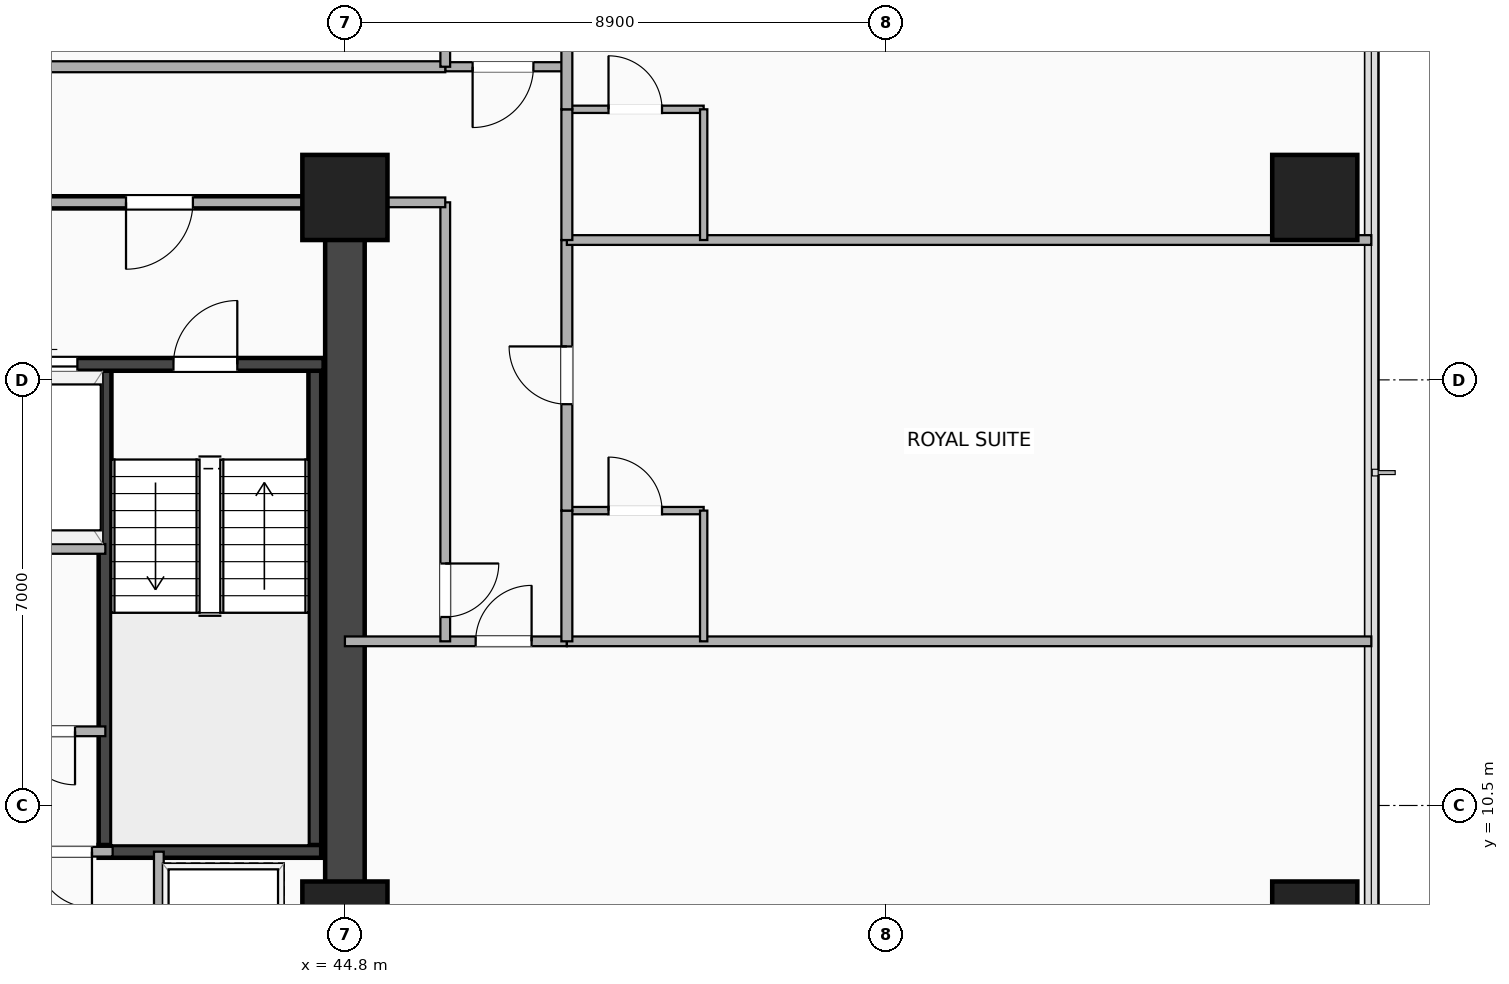
"""IFC4 building model, lengths in metres.
Left out: names, types, materials, properties, quantities, classifications, styles, units other than length and angle.
Written with IfcOpenShell. Run it as: python <this file> out.ifc"""

import sys

from ifc_helpers import new_model, si_unit, direction, frame, frame_2d, origin, origin_2d, place, context, subcontext, project, spatial, rectangle, extrude, element, fill, save


model = new_model("IFC4")
c1 = context("Model", 3, precision=1e-05, world=origin(), true_north=direction((0.0, 1.0)))
c2 = subcontext(c1, "Body", "Model", "MODEL_VIEW")
j1 = project(units=[si_unit("LENGTHUNIT", "METRE"), si_unit("PLANEANGLEUNIT", "RADIAN")], contexts=[c1])
p1 = place(None, origin())
s1 = spatial("IfcSite", under=j1, at=p1, CompositionType="ELEMENT")
p2 = place(p1, origin())
s2 = spatial("IfcBuilding", under=s1, at=p2, CompositionType="ELEMENT")
p3 = place(p2, frame((0.0, 0.0, 68.4)))
s3 = spatial("IfcBuildingStorey", under=s2, at=p3, CompositionType="ELEMENT", Elevation=68.4)
p4 = place(p3, frame((44.8, 3.5, 0.0), z_axis=(0.0, 0.0, 1.0), x_axis=(0.0, 1.0, 0.0)))
e1 = element("IfcWall", 1, at=p4, inside=s3, PredefinedType="SHEAR", context=c2, shape_type="SweptSolid", body=[
    extrude(rectangle(XDim=16.9, YDim=0.65, at=frame_2d((8.45, 0.0))), origin(), (0.0, 0.0, 1.0), 3.22),
])
for number, where, z_axis, x_axis in (
    (2, (40.855, 9.745, 0.0), (0.0, 0.0, 1.0), (0.0, 1.0, 0.0)),
    (3, (44.305, 9.745, 0.0), (0.0, 0.0, 1.0), (0.0, 1.0, 0.0)),
):
    element("IfcWall", number, at=place(p3, frame(where, z_axis=z_axis, x_axis=x_axis)), inside=s3, PredefinedType="SHEAR", context=c2, shape_type="SweptSolid", body=[
        extrude(rectangle(XDim=8.01, YDim=0.21, at=frame_2d((4.005, 0.0))), origin(), (0.0, 0.0, 1.0), 3.22),
    ])
p5 = place(p3, frame((40.75, 9.745, 0.0), z_axis=(0.0, 0.0, 1.0), x_axis=(1.0, 0.0, 0.0)))
e4 = element("IfcWall", 4, at=p5, inside=s3, PredefinedType="SHEAR", context=c2, shape_type="SweptSolid", body=[
    extrude(rectangle(XDim=3.66, YDim=0.21, at=frame_2d((1.83, 0.0))), origin(), (0.0, 0.0, 1.0), 3.22),
])
p6 = place(p3, frame((37.25, 17.755, 0.0), z_axis=(0.0, 0.0, 1.0), x_axis=(1.0, 0.0, 0.0)))
e5 = element("IfcWall", 5, at=p6, inside=s3, PredefinedType="SHEAR", context=c2, shape_type="SweptSolid", body=[
    extrude(rectangle(XDim=7.2, YDim=0.21, at=frame_2d((3.6, 0.0))), origin(), (0.0, 0.0, 1.0), 3.22),
])
p7 = place(p6, frame((0.25, 0.0, 0.0)))
e6 = element("IfcOpeningElement", 6, at=p7, cuts=e5, PredefinedType="OPENING", context=c2, shape_type="SweptSolid", body=[
    extrude(rectangle(XDim=1.12, YDim=2.2, at=frame_2d((0.56, 1.1))), frame((0.0, 0.115, 0.0), z_axis=(0.0, -1.0, 0.0), x_axis=(1.0, 0.0, 0.0)), (0.0, 0.0, 1.0), 0.23),
])
p8 = place(p6, frame((2.05, 0.0, 0.0)))
e7 = element("IfcOpeningElement", 7, at=p8, cuts=e5, PredefinedType="OPENING", context=c2, shape_type="SweptSolid", body=[
    extrude(rectangle(XDim=1.1, YDim=2.18, at=frame_2d((0.55, 1.09))), frame((0.0, 0.115, 0.0), z_axis=(0.0, -1.0, 0.0), x_axis=(1.0, 0.0, 0.0)), (0.0, 0.0, 1.0), 0.23),
])
p9 = place(p6, frame((5.78, 0.0, 0.0), z_axis=(0.0, 0.0, 1.0), x_axis=(-1.0, 0.0, 0.0)))
e8 = element("IfcOpeningElement", 8, at=p9, cuts=e5, PredefinedType="OPENING", context=c2, shape_type="SweptSolid", body=[
    extrude(rectangle(XDim=1.05, YDim=2.15, at=frame_2d((0.525, 1.075))), frame((0.0, 0.115, 0.0), z_axis=(0.0, -1.0, 0.0), x_axis=(1.0, 0.0, 0.0)), (0.0, 0.0, 1.0), 0.23),
])
for number, where, z_axis, x_axis in (
    (9, (44.8, 8.55, -0.28), (0.0, 0.0, 1.0), (1.0, 0.0, 0.0)),
    (10, (44.8, 20.5, -0.28), (0.0, 0.0, 1.0), (1.0, 0.0, 0.0)),
    (11, (60.75, 8.55, -0.28), (0.0, 0.0, 1.0), (1.0, 0.0, 0.0)),
    (12, (60.75, 20.5, -0.28), (0.0, 0.0, 1.0), (1.0, 0.0, 0.0)),
):
    element("IfcColumn", number, at=place(p3, frame(where, z_axis=z_axis, x_axis=x_axis)), inside=s3, PredefinedType="COLUMN", context=c2, shape_type="SweptSolid", body=[
        extrude(rectangle(XDim=1.4, YDim=1.4, at=origin_2d()), origin(), (0.0, 0.0, 1.0), 3.5),
    ])
p10 = place(p3, frame((37.25, 14.72, 0.0), z_axis=(0.0, 0.0, 1.0), x_axis=(1.0, 0.0, 0.0)))
e13 = element("IfcWall", 13, at=p10, inside=s3, PredefinedType="PARTITIONING", context=c2, shape_type="SweptSolid", body=[
    extrude(rectangle(XDim=3.61, YDim=0.16, at=frame_2d((1.805, 0.0))), origin(), (0.0, 0.0, 1.0), 3.22),
])
p11 = place(p3, frame((37.0, 20.42, 0.0), z_axis=(0.0, 0.0, 1.0), x_axis=(1.0, 0.0, 0.0)))
e14 = element("IfcWall", 14, at=p11, inside=s3, PredefinedType="PARTITIONING", context=c2, shape_type="SweptSolid", body=[
    extrude(rectangle(XDim=7.45, YDim=0.2, at=frame_2d((3.725, 0.0))), origin(), (0.0, 0.0, 1.0), 2.51),
])
p12 = place(p11, frame((4.2, 0.0, 0.0)))
e15 = element("IfcOpeningElement", 15, at=p12, cuts=e14, PredefinedType="OPENING", context=c2, shape_type="SweptSolid", body=[
    extrude(rectangle(XDim=1.1, YDim=2.15, at=frame_2d((0.55, 1.075))), frame((0.0, 0.11, 0.0), z_axis=(0.0, -1.0, 0.0), x_axis=(1.0, 0.0, 0.0)), (0.0, 0.0, 1.0), 0.22),
])
p13 = place(p3, frame((38.983, 11.72, 0.0), z_axis=(0.0, 0.0, 1.0), x_axis=(1.0, 0.0, 0.0)))
e16 = element("IfcWall", 16, at=p13, inside=s3, PredefinedType="PARTITIONING", context=c2, shape_type="SweptSolid", body=[
    extrude(rectangle(XDim=1.877, YDim=0.16, at=frame_2d((0.938, 0.0))), origin(), (0.0, 0.0, 1.0), 3.22),
])
p14 = place(p13, frame((0.499, 0.0, 0.0)))
e17 = element("IfcOpeningElement", 17, at=p14, cuts=e16, PredefinedType="OPENING", context=c2, shape_type="SweptSolid", body=[
    extrude(rectangle(XDim=0.88, YDim=2.08, at=frame_2d((0.44, 1.04))), frame((0.0, 0.09, 0.0), z_axis=(0.0, -1.0, 0.0), x_axis=(1.0, 0.0, 0.0)), (0.0, 0.0, 1.0), 0.18),
])
p15 = place(p3, frame((41.74, 3.9, 0.0), z_axis=(0.0, 0.0, 1.0), x_axis=(0.0, 1.0, 0.0)))
e18 = element("IfcWall", 18, at=p15, inside=s3, PredefinedType="PARTITIONING", context=c2, shape_type="SweptSolid", body=[
    extrude(rectangle(XDim=5.84, YDim=0.16, at=frame_2d((2.92, 0.0))), origin(), (0.0, 0.0, 1.0), 3.22),
])
p16 = place(p3, frame((39.42, 9.74, 0.0), z_axis=(0.0, 0.0, 1.0), x_axis=(1.0, 0.0, 0.0)))
e19 = element("IfcWall", 19, at=p16, inside=s3, PredefinedType="PARTITIONING", context=c2, shape_type="SweptSolid", body=[
    extrude(rectangle(XDim=1.56, YDim=0.16, at=frame_2d((0.78, 0.0))), origin(), (0.0, 0.0, 1.0), 3.22),
])
p17 = place(p16, frame((0.3, 0.0, 0.0)))
e20 = element("IfcOpeningElement", 20, at=p17, cuts=e19, PredefinedType="OPENING", context=c2, shape_type="SweptSolid", body=[
    extrude(rectangle(XDim=0.92, YDim=2.08, at=frame_2d((0.46, 1.04))), frame((0.0, 0.09, 0.0), z_axis=(0.0, -1.0, 0.0), x_axis=(1.0, 0.0, 0.0)), (0.0, 0.0, 1.0), 0.18),
])
p18 = place(p3, frame((44.8, 13.2, 0.0), z_axis=(0.0, 0.0, 1.0), x_axis=(1.0, 0.0, 0.0)))
e21 = element("IfcWall", 21, at=p18, inside=s3, PredefinedType="PARTITIONING", context=c2, shape_type="SweptSolid", body=[
    extrude(rectangle(XDim=3.65, YDim=0.16, at=frame_2d((1.825, 0.0))), origin(), (0.0, 0.0, 1.0), 2.51),
])
p19 = place(p18, frame((3.07, 0.0, 0.0), z_axis=(0.0, 0.0, 1.0), x_axis=(-1.0, 0.0, 0.0)))
e22 = element("IfcOpeningElement", 22, at=p19, cuts=e21, PredefinedType="OPENING", context=c2, shape_type="SweptSolid", body=[
    extrude(rectangle(XDim=0.92, YDim=2.08, at=frame_2d((0.46, 1.04))), frame((0.0, 0.09, 0.0), z_axis=(0.0, -1.0, 0.0), x_axis=(1.0, 0.0, 0.0)), (0.0, 0.0, 1.0), 0.18),
])
p20 = place(p3, frame((46.45, 13.2, 0.0), z_axis=(0.0, 0.0, 1.0), x_axis=(0.0, 1.0, 0.0)))
e23 = element("IfcWall", 23, at=p20, inside=s3, PredefinedType="PARTITIONING", context=c2, shape_type="SweptSolid", body=[
    extrude(rectangle(XDim=7.22, YDim=0.16, at=frame_2d((3.61, 0.0))), origin(), (0.0, 0.0, 1.0), 2.51),
])
p21 = place(p20, frame((0.4, 0.0, 0.0)))
e24 = element("IfcOpeningElement", 24, at=p21, cuts=e23, PredefinedType="OPENING", context=c2, shape_type="SweptSolid", body=[
    extrude(rectangle(XDim=0.88, YDim=2.08, at=frame_2d((0.44, 1.04))), frame((0.0, 0.09, 0.0), z_axis=(0.0, -1.0, 0.0), x_axis=(1.0, 0.0, 0.0)), (0.0, 0.0, 1.0), 0.18),
])
p22 = place(p3, frame((44.8, 20.42, 0.0), z_axis=(0.0, 0.0, 1.0), x_axis=(1.0, 0.0, 0.0)))
e25 = element("IfcWall", 25, at=p22, inside=s3, PredefinedType="PARTITIONING", context=c2, shape_type="SweptSolid", body=[
    extrude(rectangle(XDim=1.65, YDim=0.16, at=frame_2d((0.825, 0.0))), origin(), (0.0, 0.0, 1.0), 2.51),
])
p23 = place(p3, frame((46.45, 22.65, 0.0), z_axis=(0.0, 0.0, 1.0), x_axis=(1.0, 0.0, 0.0)))
e26 = element("IfcWall", 26, at=p23, inside=s3, PredefinedType="PARTITIONING", context=c2, shape_type="SweptSolid", body=[
    extrude(rectangle(XDim=2.0, YDim=0.15, at=frame_2d((1.0, 0.0))), origin(), (0.0, 0.0, 1.0), 3.22),
])
p24 = place(p23, frame((0.45, 0.0, 0.0)))
e27 = element("IfcOpeningElement", 27, at=p24, cuts=e26, PredefinedType="OPENING", context=c2, shape_type="SweptSolid", body=[
    extrude(rectangle(XDim=1.0, YDim=2.15, at=frame_2d((0.5, 1.075))), frame((0.0, 0.085, 0.0), z_axis=(0.0, -1.0, 0.0), x_axis=(1.0, 0.0, 0.0)), (0.0, 0.0, 1.0), 0.17),
])
p25 = place(p3, frame((24.1, 22.65, 0.0), z_axis=(0.0, 0.0, 1.0), x_axis=(1.0, 0.0, 0.0)))
e28 = element("IfcWall", 28, at=p25, inside=s3, PredefinedType="PARTITIONING", context=c2, shape_type="SweptSolid", body=[
    extrude(rectangle(XDim=22.35, YDim=0.18, at=frame_2d((11.175, 0.0))), origin(), (0.0, 0.0, 1.0), 2.51),
])
p26 = place(p25, frame((10.7, 0.0, 0.0)))
e29 = element("IfcOpeningElement", 29, at=p26, cuts=e28, PredefinedType="OPENING", context=c2, shape_type="SweptSolid", body=[
    extrude(rectangle(XDim=0.95, YDim=2.15, at=frame_2d((0.475, 1.075))), frame((0.0, 0.1, 0.0), z_axis=(0.0, -1.0, 0.0), x_axis=(1.0, 0.0, 0.0)), (0.0, 0.0, 1.0), 0.2),
])
p27 = place(p3, frame((46.45, 22.65, 0.0), z_axis=(0.0, 0.0, 1.0), x_axis=(0.0, 1.0, 0.0)))
e30 = element("IfcWall", 30, at=p27, inside=s3, PredefinedType="PARTITIONING", context=c2, shape_type="SweptSolid", body=[
    extrude(rectangle(XDim=10.35, YDim=0.16, at=frame_2d((5.175, 0.0))), origin(), (0.0, 0.0, 1.0), 2.51),
])
p28 = place(p3, frame((48.45, 13.2, 0.0), z_axis=(0.0, 0.0, 1.0), x_axis=(1.0, 0.0, 0.0)))
e31 = element("IfcWall", 31, at=p28, inside=s3, PredefinedType="PARTITIONING", context=c2, shape_type="SweptSolid", body=[
    extrude(rectangle(XDim=13.23, YDim=0.16, at=frame_2d((6.615, 0.0))), origin(), (0.0, 0.0, 1.0), 2.583),
])
p29 = place(p3, frame((48.45, 15.35, 0.0), z_axis=(0.0, 0.0, 1.0), x_axis=(1.0, 0.0, 0.0)))
e32 = element("IfcWall", 32, at=p29, inside=s3, PredefinedType="PARTITIONING", context=c2, shape_type="SweptSolid", body=[
    extrude(rectangle(XDim=2.25, YDim=0.12, at=frame_2d((1.125, 0.0))), origin(), (0.0, 0.0, 1.0), 3.22),
])
p30 = place(p29, frame((1.565, 0.0, 0.0), z_axis=(0.0, 0.0, 1.0), x_axis=(-1.0, 0.0, 0.0)))
e33 = element("IfcOpeningElement", 33, at=p30, cuts=e32, PredefinedType="OPENING", context=c2, shape_type="SweptSolid", body=[
    extrude(rectangle(XDim=0.88, YDim=2.08, at=frame_2d((0.44, 1.04))), frame((0.0, 0.07, 0.0), z_axis=(0.0, -1.0, 0.0), x_axis=(1.0, 0.0, 0.0)), (0.0, 0.0, 1.0), 0.14),
])
p31 = place(p3, frame((50.7, 13.2, 0.0), z_axis=(0.0, 0.0, 1.0), x_axis=(0.0, 1.0, 0.0)))
e34 = element("IfcWall", 34, at=p31, inside=s3, PredefinedType="PARTITIONING", context=c2, shape_type="SweptSolid", body=[
    extrude(rectangle(XDim=2.15, YDim=0.12, at=frame_2d((1.075, 0.0))), origin(), (0.0, 0.0, 1.0), 2.902),
])
p32 = place(p3, frame((48.45, 13.2, 0.0), z_axis=(0.0, 0.0, 1.0), x_axis=(0.0, 1.0, 0.0)))
e35 = element("IfcWall", 35, at=p32, inside=s3, PredefinedType="PARTITIONING", context=c2, shape_type="SweptSolid", body=[
    extrude(rectangle(XDim=2.15, YDim=0.18, at=frame_2d((1.075, 0.0))), origin(), (0.0, 0.0, 1.0), 2.902),
])
p33 = place(p3, frame((48.45, 15.35, 0.0), z_axis=(0.0, 0.0, 1.0), x_axis=(0.0, 1.0, 0.0)))
e36 = element("IfcWall", 36, at=p33, inside=s3, PredefinedType="PARTITIONING", context=c2, shape_type="SweptSolid", body=[
    extrude(rectangle(XDim=4.45, YDim=0.18, at=frame_2d((2.225, 0.0))), origin(), (0.0, 0.0, 1.0), 2.902),
])
p34 = place(p33, frame((2.7, 0.0, 0.0), z_axis=(0.0, 0.0, 1.0), x_axis=(-1.0, 0.0, 0.0)))
e37 = element("IfcOpeningElement", 37, at=p34, cuts=e36, PredefinedType="OPENING", context=c2, shape_type="SweptSolid", body=[
    extrude(rectangle(XDim=0.95, YDim=2.15, at=frame_2d((0.475, 1.075))), frame((0.0, 0.1, 0.0), z_axis=(0.0, -1.0, 0.0), x_axis=(1.0, 0.0, 0.0)), (0.0, 0.0, 1.0), 0.2),
])
p35 = place(p3, frame((48.45, 19.8, 0.0), z_axis=(0.0, 0.0, 1.0), x_axis=(1.0, 0.0, 0.0)))
e38 = element("IfcWall", 38, at=p35, inside=s3, PredefinedType="PARTITIONING", context=c2, shape_type="SweptSolid", body=[
    extrude(rectangle(XDim=13.23, YDim=0.16, at=frame_2d((6.615, 0.0))), origin(), (0.0, 0.0, 1.0), 2.583),
])
p36 = place(p3, frame((48.45, 21.95, 0.0), z_axis=(0.0, 0.0, 1.0), x_axis=(1.0, 0.0, 0.0)))
e39 = element("IfcWall", 39, at=p36, inside=s3, PredefinedType="PARTITIONING", context=c2, shape_type="SweptSolid", body=[
    extrude(rectangle(XDim=2.25, YDim=0.12, at=frame_2d((1.125, 0.0))), origin(), (0.0, 0.0, 1.0), 3.22),
])
p37 = place(p36, frame((1.565, 0.0, 0.0), z_axis=(0.0, 0.0, 1.0), x_axis=(-1.0, 0.0, 0.0)))
e40 = element("IfcOpeningElement", 40, at=p37, cuts=e39, PredefinedType="OPENING", context=c2, shape_type="SweptSolid", body=[
    extrude(rectangle(XDim=0.88, YDim=2.08, at=frame_2d((0.44, 1.04))), frame((0.0, 0.07, 0.0), z_axis=(0.0, -1.0, 0.0), x_axis=(1.0, 0.0, 0.0)), (0.0, 0.0, 1.0), 0.14),
])
p38 = place(p3, frame((50.7, 19.8, 0.0), z_axis=(0.0, 0.0, 1.0), x_axis=(0.0, 1.0, 0.0)))
e41 = element("IfcWall", 41, at=p38, inside=s3, PredefinedType="PARTITIONING", context=c2, shape_type="SweptSolid", body=[
    extrude(rectangle(XDim=2.15, YDim=0.12, at=frame_2d((1.075, 0.0))), origin(), (0.0, 0.0, 1.0), 2.51),
])
p39 = place(p3, frame((48.45, 19.8, 0.0), z_axis=(0.0, 0.0, 1.0), x_axis=(0.0, 1.0, 0.0)))
e42 = element("IfcWall", 42, at=p39, inside=s3, PredefinedType="PARTITIONING", context=c2, shape_type="SweptSolid", body=[
    extrude(rectangle(XDim=2.15, YDim=0.18, at=frame_2d((1.075, 0.0))), origin(), (0.0, 0.0, 1.0), 2.51),
])
p40 = place(p3, frame((48.45, 21.95, 0.0), z_axis=(0.0, 0.0, 1.0), x_axis=(0.0, 1.0, 0.0)))
e43 = element("IfcWall", 43, at=p40, inside=s3, PredefinedType="PARTITIONING", context=c2, shape_type="SweptSolid", body=[
    extrude(rectangle(XDim=4.45, YDim=0.18, at=frame_2d((2.225, 0.0))), origin(), (0.0, 0.0, 1.0), 2.788),
])
p41 = place(p40, frame((2.7, 0.0, 0.0), z_axis=(0.0, 0.0, 1.0), x_axis=(-1.0, 0.0, 0.0)))
e44 = element("IfcOpeningElement", 44, at=p41, cuts=e43, PredefinedType="OPENING", context=c2, shape_type="SweptSolid", body=[
    extrude(rectangle(XDim=0.95, YDim=2.15, at=frame_2d((0.475, 1.075))), frame((0.0, 0.1, 0.0), z_axis=(0.0, -1.0, 0.0), x_axis=(1.0, 0.0, 0.0)), (0.0, 0.0, 1.0), 0.2),
])
p42 = place(p8, origin())
e45 = element("IfcDoor", 45, at=p42, inside=s3, OperationType="DOUBLE_DOOR_SLIDING", PredefinedType="DOOR", context=c2, shape_type="SweptSolid", body=[
    extrude(rectangle(XDim=1.1, YDim=2.18, at=frame_2d((0.55, 1.09))), frame((0.0, 0.025, 0.0), z_axis=(0.0, -1.0, 0.0), x_axis=(1.0, 0.0, 0.0)), (0.0, 0.0, 1.0), 0.05),
])
fill(e7, e45)
p43 = place(p9, origin())
e46 = element("IfcDoor", 46, at=p43, inside=s3, OperationType="SINGLE_SWING_RIGHT", PredefinedType="DOOR", context=c2, shape_type="SweptSolid", body=[
    extrude(rectangle(XDim=1.05, YDim=2.15, at=frame_2d((0.525, 1.075))), frame((0.0, 0.025, 0.0), z_axis=(0.0, -1.0, 0.0), x_axis=(1.0, 0.0, 0.0)), (0.0, 0.0, 1.0), 0.05),
])
fill(e8, e46)
p44 = place(p12, origin())
e47 = element("IfcDoor", 47, at=p44, inside=s3, OperationType="SINGLE_SWING_LEFT", PredefinedType="DOOR", context=c2, shape_type="SweptSolid", body=[
    extrude(rectangle(XDim=1.1, YDim=2.15, at=frame_2d((0.55, 1.075))), frame((0.0, 0.025, 0.0), z_axis=(0.0, -1.0, 0.0), x_axis=(1.0, 0.0, 0.0)), (0.0, 0.0, 1.0), 0.05),
])
fill(e15, e47)
p45 = place(p14, origin())
e48 = element("IfcDoor", 48, at=p45, inside=s3, OperationType="SINGLE_SWING_RIGHT", PredefinedType="DOOR", context=c2, shape_type="SweptSolid", body=[
    extrude(rectangle(XDim=0.88, YDim=2.08, at=frame_2d((0.44, 1.04))), frame((0.0, 0.025, 0.0), z_axis=(0.0, -1.0, 0.0), x_axis=(1.0, 0.0, 0.0)), (0.0, 0.0, 1.0), 0.05),
])
fill(e17, e48)
p46 = place(p17, origin())
e49 = element("IfcDoor", 49, at=p46, inside=s3, OperationType="SINGLE_SWING_RIGHT", PredefinedType="DOOR", context=c2, shape_type="SweptSolid", body=[
    extrude(rectangle(XDim=0.92, YDim=2.08, at=frame_2d((0.46, 1.04))), frame((0.0, 0.025, 0.0), z_axis=(0.0, -1.0, 0.0), x_axis=(1.0, 0.0, 0.0)), (0.0, 0.0, 1.0), 0.05),
])
fill(e20, e49)
p47 = place(p19, origin())
e50 = element("IfcDoor", 50, at=p47, inside=s3, OperationType="SINGLE_SWING_RIGHT", PredefinedType="DOOR", context=c2, shape_type="SweptSolid", body=[
    extrude(rectangle(XDim=0.92, YDim=2.08, at=frame_2d((0.46, 1.04))), frame((0.0, 0.025, 0.0), z_axis=(0.0, -1.0, 0.0), x_axis=(1.0, 0.0, 0.0)), (0.0, 0.0, 1.0), 0.05),
])
fill(e22, e50)
p48 = place(p21, origin())
e51 = element("IfcDoor", 51, at=p48, inside=s3, OperationType="SINGLE_SWING_RIGHT", PredefinedType="DOOR", context=c2, shape_type="SweptSolid", body=[
    extrude(rectangle(XDim=0.88, YDim=2.08, at=frame_2d((0.44, 1.04))), frame((0.0, 0.025, 0.0), z_axis=(0.0, -1.0, 0.0), x_axis=(1.0, 0.0, 0.0)), (0.0, 0.0, 1.0), 0.05),
])
fill(e24, e51)
p49 = place(p24, origin())
e52 = element("IfcDoor", 52, at=p49, inside=s3, OperationType="SINGLE_SWING_LEFT", PredefinedType="DOOR", context=c2, shape_type="SweptSolid", body=[
    extrude(rectangle(XDim=1.0, YDim=2.15, at=frame_2d((0.5, 1.075))), frame((0.0, 0.025, 0.0), z_axis=(0.0, -1.0, 0.0), x_axis=(1.0, 0.0, 0.0)), (0.0, 0.0, 1.0), 0.05),
])
fill(e27, e52)
p50 = place(p30, origin())
e53 = element("IfcDoor", 53, at=p50, inside=s3, OperationType="SINGLE_SWING_LEFT", PredefinedType="DOOR", context=c2, shape_type="SweptSolid", body=[
    extrude(rectangle(XDim=0.88, YDim=2.08, at=frame_2d((0.44, 1.04))), frame((0.0, 0.025, 0.0), z_axis=(0.0, -1.0, 0.0), x_axis=(1.0, 0.0, 0.0)), (0.0, 0.0, 1.0), 0.05),
])
fill(e33, e53)
p51 = place(p34, origin())
e54 = element("IfcDoor", 54, at=p51, inside=s3, OperationType="SINGLE_SWING_RIGHT", PredefinedType="DOOR", context=c2, shape_type="SweptSolid", body=[
    extrude(rectangle(XDim=0.95, YDim=2.15, at=frame_2d((0.475, 1.075))), frame((0.0, 0.025, 0.0), z_axis=(0.0, -1.0, 0.0), x_axis=(1.0, 0.0, 0.0)), (0.0, 0.0, 1.0), 0.05),
])
fill(e37, e54)
p52 = place(p37, origin())
e55 = element("IfcDoor", 55, at=p52, inside=s3, OperationType="SINGLE_SWING_LEFT", PredefinedType="DOOR", context=c2, shape_type="SweptSolid", body=[
    extrude(rectangle(XDim=0.88, YDim=2.08, at=frame_2d((0.44, 1.04))), frame((0.0, 0.025, 0.0), z_axis=(0.0, -1.0, 0.0), x_axis=(1.0, 0.0, 0.0)), (0.0, 0.0, 1.0), 0.05),
])
fill(e40, e55)
save(model, sys.argv[1])
